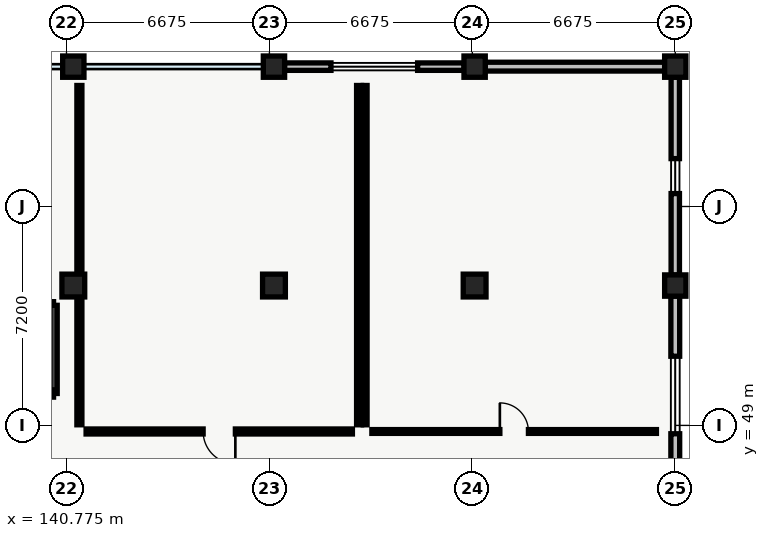
"""IFC4 building model, lengths in metres.
Left out: names, types, materials, properties, quantities, classifications, styles, units other than length and angle.
Written with IfcOpenShell. Run it as: python <this file> out.ifc"""

import sys

from ifc_helpers import new_model, si_unit, direction, frame, frame_2d, origin, origin_2d, place, context, subcontext, project, spatial, rectangle, extrude, element, fill, save


model = new_model("IFC4")
c1 = context("Model", 3, precision=1e-05, world=origin(), true_north=direction((0.0, 1.0)))
c2 = subcontext(c1, "Body", "Model", "MODEL_VIEW")
j1 = project(units=[si_unit("LENGTHUNIT", "METRE"), si_unit("PLANEANGLEUNIT", "RADIAN")], contexts=[c1])
p1 = place(None, origin())
s1 = spatial("IfcSite", under=j1, at=p1, CompositionType="ELEMENT")
p2 = place(p1, origin())
s2 = spatial("IfcBuilding", under=s1, at=p2, CompositionType="ELEMENT")
p3 = place(p2, frame((0.0, 0.0, 5.1)))
s3 = spatial("IfcBuildingStorey", under=s2, at=p3, CompositionType="ELEMENT", Elevation=5.1)
p4 = place(p3, frame((141.0, 53.6, 0.0), z_axis=(0.0, 0.0, 1.0), x_axis=(1.0, 0.0, 0.0)))
e1 = element("IfcColumn", 1, at=p4, inside=s3, PredefinedType="COLUMN", context=c2, shape_type="SweptSolid", body=[
    extrude(rectangle(XDim=0.75, YDim=0.75, at=origin_2d()), origin(), (0.0, 0.0, 1.0), 4.29),
])
p5 = place(p3, frame((141.0, 60.8, 0.0), z_axis=(0.0, 0.0, 1.0), x_axis=(1.0, 0.0, 0.0)))
e2 = element("IfcColumn", 2, at=p5, inside=s3, PredefinedType="COLUMN", context=c2, shape_type="SweptSolid", body=[
    extrude(rectangle(XDim=0.7, YDim=0.7, at=origin_2d()), origin(), (0.0, 0.0, 1.0), 4.29),
])
p6 = place(p3, frame((147.6, 53.6, 0.0), z_axis=(0.0, 0.0, 1.0), x_axis=(1.0, 0.0, 0.0)))
e3 = element("IfcColumn", 3, at=p6, inside=s3, PredefinedType="COLUMN", context=c2, shape_type="SweptSolid", body=[
    extrude(rectangle(XDim=0.75, YDim=0.75, at=origin_2d()), origin(), (0.0, 0.0, 1.0), 4.29),
])
p7 = place(p3, frame((147.6, 60.8, 0.0), z_axis=(0.0, 0.0, 1.0), x_axis=(1.0, 0.0, 0.0)))
e4 = element("IfcColumn", 4, at=p7, inside=s3, PredefinedType="COLUMN", context=c2, shape_type="SweptSolid", body=[
    extrude(rectangle(XDim=0.7, YDim=0.7, at=origin_2d()), origin(), (0.0, 0.0, 1.0), 4.29),
])
p8 = place(p3, frame((154.2, 53.6, 0.0), z_axis=(0.0, 0.0, 1.0), x_axis=(1.0, 0.0, 0.0)))
e5 = element("IfcColumn", 5, at=p8, inside=s3, PredefinedType="COLUMN", context=c2, shape_type="SweptSolid", body=[
    extrude(rectangle(XDim=0.75, YDim=0.75, at=origin_2d()), origin(), (0.0, 0.0, 1.0), 4.29),
])
for number, where, z_axis, x_axis in (
    (6, (154.2, 60.8, 0.0), (0.0, 0.0, 1.0), (1.0, 0.0, 0.0)),
    (7, (160.8, 53.6, 0.0), (0.0, 0.0, 1.0), (1.0, 0.0, 0.0)),
    (8, (160.8, 60.8, 0.0), (0.0, 0.0, 1.0), (1.0, 0.0, 0.0)),
):
    element("IfcColumn", number, at=place(p3, frame(where, z_axis=z_axis, x_axis=x_axis)), inside=s3, PredefinedType="COLUMN", context=c2, shape_type="SweptSolid", body=[
        extrude(rectangle(XDim=0.7, YDim=0.7, at=origin_2d()), origin(), (0.0, 0.0, 1.0), 4.29),
    ])
p9 = place(p3, frame((147.945, 60.8, 0.0), z_axis=(0.0, 0.0, 1.0), x_axis=(1.0, 0.0, 0.0)))
e9 = element("IfcWall", 9, at=p9, inside=s3, PredefinedType="STANDARD", context=c2, shape_type="SweptSolid", body=[
    extrude(rectangle(XDim=5.91, YDim=0.245, at=frame_2d((2.955, 0.0))), origin(), (0.0, 0.0, 1.0), 3.775),
])
p10 = place(p9, frame((1.53, 0.0, 0.95)))
e10 = element("IfcOpeningElement", 10, at=p10, cuts=e9, PredefinedType="OPENING", context=c2, shape_type="SweptSolid", body=[
    extrude(rectangle(XDim=2.85, YDim=1.5, at=frame_2d((1.425, 0.75))), frame((0.0, 0.123, 0.0), z_axis=(0.0, -1.0, 0.0), x_axis=(1.0, 0.0, 0.0)), (0.0, 0.0, 1.0), 0.245),
])
p11 = place(p3, frame((154.545, 60.8, 0.0), z_axis=(0.0, 0.0, 1.0), x_axis=(1.0, 0.0, 0.0)))
e11 = element("IfcWall", 11, at=p11, inside=s3, PredefinedType="STANDARD", context=c2, shape_type="SweptSolid", body=[
    extrude(rectangle(XDim=5.91, YDim=0.29, at=frame_2d((2.955, 0.0))), origin(), (0.0, 0.0, 1.0), 3.775),
])
p12 = place(p3, frame((160.8, 60.455, 0.0), z_axis=(0.0, 0.0, 1.0), x_axis=(0.0, -1.0, 0.0)))
e12 = element("IfcWall", 12, at=p12, inside=s3, PredefinedType="STANDARD", context=c2, shape_type="SweptSolid", body=[
    extrude(rectangle(XDim=6.51, YDim=0.275, at=frame_2d((3.255, 0.0))), origin(), (0.0, 0.0, 1.0), 3.775),
])
p13 = place(p12, frame((2.68, 0.0, 0.95)))
e13 = element("IfcOpeningElement", 13, at=p13, cuts=e12, PredefinedType="OPENING", context=c2, shape_type="SweptSolid", body=[
    extrude(rectangle(XDim=1.15, YDim=1.6, at=frame_2d((0.575, 0.8))), frame((0.0, 0.137, 0.0), z_axis=(0.0, -1.0, 0.0), x_axis=(1.0, 0.0, 0.0)), (0.0, 0.0, 1.0), 0.275),
])
p14 = place(p3, frame((160.8, 53.255, 0.0), z_axis=(0.0, 0.0, 1.0), x_axis=(0.0, -1.0, 0.0)))
e14 = element("IfcWall", 14, at=p14, inside=s3, PredefinedType="STANDARD", context=c2, shape_type="SweptSolid", body=[
    extrude(rectangle(XDim=6.51, YDim=0.29, at=frame_2d((3.255, 0.0))), origin(), (0.0, 0.0, 1.0), 3.775),
])
p15 = place(p14, frame((1.98, 0.0, 0.95)))
e15 = element("IfcOpeningElement", 15, at=p15, cuts=e14, PredefinedType="OPENING", context=c2, shape_type="SweptSolid", body=[
    extrude(rectangle(XDim=2.55, YDim=1.75, at=frame_2d((1.275, 0.875))), frame((0.0, 0.145, 0.0), z_axis=(0.0, -1.0, 0.0), x_axis=(1.0, 0.0, 0.0)), (0.0, 0.0, 1.0), 0.29),
])
p16 = place(p3, frame((138.05, 52.95, 0.0), z_axis=(0.0, 0.0, 1.0), x_axis=(1.0, 0.0, 0.0)))
e16 = element("IfcWall", 16, at=p16, inside=s3, PredefinedType="SHEAR", context=c2, shape_type="SweptSolid", body=[
    extrude(rectangle(XDim=2.3, YDim=0.24, at=frame_2d((1.15, 0.0))), origin(), (0.0, 0.0, 1.0), 4.28),
])
p17 = place(p3, frame((140.35, 52.95, 0.0), z_axis=(0.0, 0.0, 1.0), x_axis=(0.0, -1.0, 0.0)))
e17 = element("IfcWall", 17, at=p17, inside=s3, PredefinedType="SHEAR", context=c2, shape_type="SweptSolid", body=[
    extrude(rectangle(XDim=2.9, YDim=0.24, at=frame_2d((1.45, 0.0))), origin(), (0.0, 0.0, 1.0), 4.28),
])
p18 = place(p3, frame((140.35, 50.05, 0.0), z_axis=(0.0, 0.0, 1.0), x_axis=(-1.0, 0.0, 0.0)))
e18 = element("IfcWall", 18, at=p18, inside=s3, PredefinedType="SHEAR", context=c2, shape_type="SweptSolid", body=[
    extrude(rectangle(XDim=2.3, YDim=0.24, at=frame_2d((1.15, 0.0))), origin(), (0.0, 0.0, 1.0), 4.28),
])
p19 = place(p18, frame((0.425, 0.0, 0.0)))
e19 = element("IfcOpeningElement", 19, at=p19, cuts=e18, PredefinedType="OPENING", context=c2, shape_type="SweptSolid", body=[
    extrude(rectangle(XDim=1.45, YDim=2.3, at=frame_2d((0.725, 1.15))), frame((0.0, 0.12, 0.0), z_axis=(0.0, -1.0, 0.0), x_axis=(1.0, 0.0, 0.0)), (0.0, 0.0, 1.0), 0.24),
])
p20 = place(p3, frame((141.42, 48.8, 0.0), z_axis=(0.0, 0.0, 1.0), x_axis=(1.0, 0.0, 0.0)))
e20 = element("IfcWall", 20, at=p20, inside=s3, PredefinedType="PARTITIONING", context=c2, shape_type="SweptSolid", body=[
    extrude(rectangle(XDim=8.76, YDim=0.165, at=frame_2d((4.38, 0.0))), origin(), (0.0, 0.0, 1.0), 3.875),
])
p21 = place(p20, frame((3.85, 0.0, 0.0)))
e21 = element("IfcOpeningElement", 21, at=p21, cuts=e20, PredefinedType="OPENING", context=c2, shape_type="SweptSolid", body=[
    extrude(rectangle(XDim=1.06, YDim=2.06, at=frame_2d((0.53, 1.03))), frame((0.0, 0.083, 0.0), z_axis=(0.0, -1.0, 0.0), x_axis=(1.0, 0.0, 0.0)), (0.0, 0.0, 1.0), 0.165),
])
p22 = place(p3, frame((150.4, 49.02, 0.0), z_axis=(0.0, 0.0, 1.0), x_axis=(0.0, 1.0, 0.0)))
e22 = element("IfcWall", 22, at=p22, inside=s3, PredefinedType="PARTITIONING", context=c2, shape_type="SweptSolid", body=[
    extrude(rectangle(XDim=11.16, YDim=0.165, at=frame_2d((5.58, 0.0))), origin(), (0.0, 0.0, 1.0), 3.95),
])
p23 = place(p3, frame((141.2, 60.18, 0.0), z_axis=(0.0, 0.0, 1.0), x_axis=(0.0, -1.0, 0.0)))
e23 = element("IfcWall", 23, at=p23, inside=s3, PredefinedType="PARTITIONING", context=c2, shape_type="SweptSolid", body=[
    extrude(rectangle(XDim=11.16, YDim=0.165, at=frame_2d((5.58, 0.0))), origin(), (0.0, 0.0, 1.0), 3.625),
])
p24 = place(p3, frame((150.82, 48.8, 0.0), z_axis=(0.0, 0.0, 1.0), x_axis=(1.0, 0.0, 0.0)))
e24 = element("IfcWall", 24, at=p24, inside=s3, PredefinedType="PARTITIONING", context=c2, shape_type="SweptSolid", body=[
    extrude(rectangle(XDim=9.36, YDim=0.125, at=frame_2d((4.68, 0.0))), origin(), (0.0, 0.0, 1.0), 3.875),
])
p25 = place(p24, frame((4.21, 0.0, 0.0)))
e25 = element("IfcOpeningElement", 25, at=p25, cuts=e24, PredefinedType="OPENING", context=c2, shape_type="SweptSolid", body=[
    extrude(rectangle(XDim=0.94, YDim=2.12, at=frame_2d((0.47, 1.06))), frame((0.0, 0.062, 0.0), z_axis=(0.0, -1.0, 0.0), x_axis=(1.0, 0.0, 0.0)), (0.0, 0.0, 1.0), 0.125),
])
p26 = place(p3, frame((150.6, 60.18, 0.0), z_axis=(0.0, 0.0, 1.0), x_axis=(0.0, -1.0, 0.0)))
e26 = element("IfcWall", 26, at=p26, inside=s3, PredefinedType="PARTITIONING", context=c2, shape_type="SweptSolid", body=[
    extrude(rectangle(XDim=11.16, YDim=0.125, at=frame_2d((5.58, 0.0))), origin(), (0.0, 0.0, 1.0), 3.95),
])
p27 = place(p10, origin())
e27 = element("IfcWindow", 27, at=p27, inside=s3, PartitioningType="SINGLE_PANEL", PredefinedType="WINDOW", context=c2, shape_type="SweptSolid", body=[
    extrude(rectangle(XDim=2.85, YDim=1.5, at=frame_2d((1.425, 0.75))), frame((0.0, 0.03, 0.0), z_axis=(0.0, -1.0, 0.0), x_axis=(1.0, 0.0, 0.0)), (0.0, 0.0, 1.0), 0.06),
])
fill(e10, e27)
p28 = place(p13, origin())
e28 = element("IfcWindow", 28, at=p28, inside=s3, PartitioningType="SINGLE_PANEL", PredefinedType="WINDOW", context=c2, shape_type="SweptSolid", body=[
    extrude(rectangle(XDim=1.15, YDim=1.6, at=frame_2d((0.575, 0.8))), frame((0.0, 0.03, 0.0), z_axis=(0.0, -1.0, 0.0), x_axis=(1.0, 0.0, 0.0)), (0.0, 0.0, 1.0), 0.06),
])
fill(e13, e28)
p29 = place(p15, origin())
e29 = element("IfcWindow", 29, at=p29, inside=s3, PartitioningType="SINGLE_PANEL", PredefinedType="WINDOW", context=c2, shape_type="SweptSolid", body=[
    extrude(rectangle(XDim=2.55, YDim=1.75, at=frame_2d((1.275, 0.875))), frame((0.0, 0.03, 0.0), z_axis=(0.0, -1.0, 0.0), x_axis=(1.0, 0.0, 0.0)), (0.0, 0.0, 1.0), 0.06),
])
fill(e15, e29)
p30 = place(p21, origin())
e30 = element("IfcDoor", 30, at=p30, inside=s3, OperationType="SINGLE_SWING_RIGHT", PredefinedType="DOOR", context=c2, shape_type="SweptSolid", body=[
    extrude(rectangle(XDim=1.06, YDim=2.06, at=frame_2d((0.53, 1.03))), frame((0.0, 0.025, 0.0), z_axis=(0.0, -1.0, 0.0), x_axis=(1.0, 0.0, 0.0)), (0.0, 0.0, 1.0), 0.05),
])
fill(e21, e30)
p31 = place(p25, origin())
e31 = element("IfcDoor", 31, at=p31, inside=s3, OperationType="SINGLE_SWING_LEFT", PredefinedType="DOOR", context=c2, shape_type="SweptSolid", body=[
    extrude(rectangle(XDim=0.94, YDim=2.12, at=frame_2d((0.47, 1.06))), frame((0.0, 0.025, 0.0), z_axis=(0.0, -1.0, 0.0), x_axis=(1.0, 0.0, 0.0)), (0.0, 0.0, 1.0), 0.05),
])
fill(e25, e31)
save(model, sys.argv[1])
